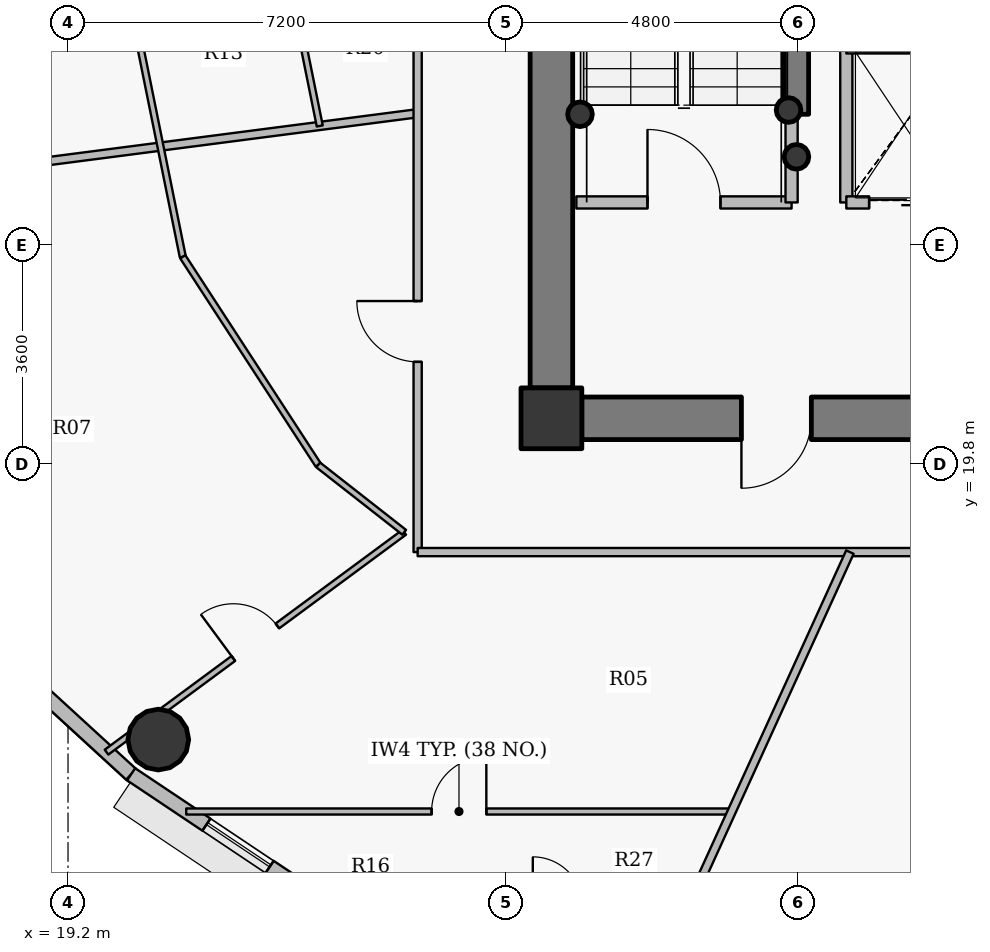
"""IFC4 building model, lengths in metres.
Left out: names, types, materials, properties, quantities, classifications, styles, units other than length and angle.
Written with IfcOpenShell. Run it as: python <this file> out.ifc"""

import sys

from ifc_helpers import new_model, si_unit, direction, frame, frame_2d, origin, origin_2d, place, context, subcontext, project, spatial, rectangle, hollow_circle, extrude, source, transform, mapped, element, fill, save


model = new_model("IFC4")
c1 = context("Model", 3, precision=1e-05, world=origin(), true_north=direction((0.0, 1.0)))
c2 = subcontext(c1, "Body", "Model", "MODEL_VIEW")
j1 = project(units=[si_unit("LENGTHUNIT", "METRE"), si_unit("PLANEANGLEUNIT", "RADIAN")], contexts=[c1])
p1 = place(None, origin())
s1 = spatial("IfcSite", under=j1, at=p1, CompositionType="ELEMENT")
p2 = place(p1, origin())
s2 = spatial("IfcBuilding", under=s1, at=p2, CompositionType="ELEMENT")
p3 = place(p2, frame((0.0, 0.0, 303.0)))
s3 = spatial("IfcBuildingStorey", under=s2, at=p3, CompositionType="ELEMENT", Elevation=303.0)
p4 = place(p3, frame((27.15, 20.55, 0.0), z_axis=(0.0, 0.0, 1.0), x_axis=(1.0, 0.0, 0.0)))
e1 = element("IfcColumn", 1, at=p4, inside=s3, PredefinedType="COLUMN", context=c2, shape_type="SweptSolid", body=[
    extrude(rectangle(XDim=1.0, YDim=1.0, at=origin_2d()), origin(), (0.0, 0.0, 1.0), 3.75),
])
for number, where, z_axis, x_axis in (
    (2, (31.05, 25.62, 0.0), (0.0, 0.0, 1.0), (1.0, 0.0, 0.0)),
    (3, (31.18, 24.85, 0.0), (0.0, 0.0, 1.0), (1.0, 0.0, 0.0)),
    (4, (27.62, 25.55, 0.0), (0.0, 0.0, 1.0), (1.0, 0.0, 0.0)),
):
    element("IfcColumn", number, at=place(p3, frame(where, z_axis=z_axis, x_axis=x_axis)), inside=s3, PredefinedType="COLUMN", context=c2, shape_type="SweptSolid", body=[
        extrude(hollow_circle(Radius=0.203, WallThickness=0.016, at=origin_2d()), origin(), (0.0, 0.0, 1.0), 3.75),
    ])
p5 = place(p3, frame((44.35, 20.55, 0.0), z_axis=(0.0, 0.0, 1.0), x_axis=(-1.0, 0.0, 0.0)))
e5 = element("IfcWall", 5, at=p5, inside=s3, PredefinedType="SHEAR", context=c2, shape_type="SweptSolid", body=[
    extrude(rectangle(XDim=16.7, YDim=0.7, at=frame_2d((8.35, 0.0))), origin(), (0.0, 0.0, 1.0), 3.05),
])
p6 = place(p5, frame((12.925, 0.0, 0.0)))
e6 = element("IfcOpeningElement", 6, at=p6, cuts=e5, PredefinedType="OPENING", context=c2, shape_type="SweptSolid", body=[
    extrude(rectangle(XDim=1.15, YDim=2.15, at=origin_2d()), frame((0.575, 0.36, 1.075), z_axis=(0.0, -1.0, 0.0), x_axis=(1.0, 0.0, 0.0)), (0.0, 0.0, 1.0), 0.72),
])
p7 = place(p5, frame((9.1, 0.0, 0.0)))
e7 = element("IfcOpeningElement", 7, at=p7, cuts=e5, PredefinedType="OPENING", context=c2, shape_type="SweptSolid", body=[
    extrude(rectangle(XDim=1.15, YDim=2.15, at=origin_2d()), frame((0.575, 0.36, 1.075), z_axis=(0.0, -1.0, 0.0), x_axis=(1.0, 0.0, 0.0)), (0.0, 0.0, 1.0), 0.72),
])
p8 = place(p3, frame((27.15, 21.05, 0.0), z_axis=(0.0, 0.0, 1.0), x_axis=(0.0, 1.0, 0.0)))
e8 = element("IfcWall", 8, at=p8, inside=s3, PredefinedType="SHEAR", context=c2, shape_type="SweptSolid", body=[
    extrude(rectangle(XDim=11.9, YDim=0.7, at=frame_2d((5.95, 0.0))), origin(), (0.0, 0.0, 1.0), 3.05),
])
p9 = place(p3, frame((31.18, 25.55, 0.0), z_axis=(0.0, 0.0, 1.0), x_axis=(0.0, 1.0, 0.0)))
e9 = element("IfcWall", 9, at=p9, inside=s3, PredefinedType="SHEAR", context=c2, shape_type="SweptSolid", body=[
    extrude(rectangle(XDim=2.25, YDim=0.4, at=frame_2d((1.125, 0.0))), origin(), (0.0, 0.0, 1.0), 3.1),
])
p10 = place(p3, frame((20.685, 15.267, 0.0), z_axis=(0.0, 0.0, 1.0), x_axis=(1.0, 0.0, 0.0)))
e10 = element("IfcColumn", 10, at=p10, inside=s3, PredefinedType="COLUMN", context=c2, shape_type="SweptSolid", body=[
    extrude(hollow_circle(Radius=0.5, WallThickness=0.032, at=origin_2d()), origin(), (0.0, 0.0, 1.0), 3.75),
])
p11 = place(p3, frame((20.238, 14.696, 0.0), z_axis=(0.0, 0.0, 1.0), x_axis=(-0.737068506972, 0.675818034703, 0.0)))
e11 = element("IfcWall", 11, at=p11, inside=s3, PredefinedType="SOLIDWALL", context=c2, shape_type="SweptSolid", body=[
    extrude(rectangle(XDim=3.077, YDim=0.24, at=frame_2d((1.539, 0.0))), origin(), (0.0, 0.0, 1.0), 3.5),
])
p12 = place(p3, frame((22.896, 12.918, 0.0), z_axis=(0.0, 0.0, 1.0), x_axis=(-0.831250592635, 0.55589787933, 0.0)))
e12 = element("IfcWall", 12, at=p12, inside=s3, PredefinedType="SOLIDWALL", context=c2, shape_type="SweptSolid", body=[
    extrude(rectangle(XDim=3.197, YDim=0.24, at=frame_2d((1.599, 0.0))), origin(), (0.0, 0.0, 1.0), 3.5),
])
p13 = place(p12, frame((0.458, 0.0, 0.9)))
e13 = element("IfcOpeningElement", 13, at=p13, cuts=e12, PredefinedType="OPENING", context=c2, shape_type="SweptSolid", body=[
    extrude(rectangle(XDim=1.25, YDim=1.65, at=origin_2d()), frame((0.625, 0.13, 0.825), z_axis=(0.0, -1.0, 0.0), x_axis=(1.0, 0.0, 0.0)), (0.0, 0.0, 1.0), 0.26),
])
p14 = place(p3, frame((14.033, 24.151, 0.0), z_axis=(0.0, 0.0, 1.0), x_axis=(0.99169266035, 0.128629963101, 0.0)))
e14 = element("IfcWall", 14, at=p14, inside=s3, PredefinedType="PARTITIONING", context=c2, shape_type="SweptSolid", body=[
    extrude(rectangle(XDim=11.009, YDim=0.135, at=frame_2d((5.504, 0.0))), origin(), (0.0, 0.0, 1.0), 2.985),
])
p15 = place(p3, frame((19.833, 15.06, 0.0), z_axis=(0.0, 0.0, 1.0), x_axis=(0.804387847123, 0.594104529019, 0.0)))
e15 = element("IfcWall", 15, at=p15, inside=s3, PredefinedType="PARTITIONING", context=c2, shape_type="SweptSolid", body=[
    extrude(rectangle(XDim=6.086, YDim=0.1, at=frame_2d((3.043, 0.0))), origin(), (0.0, 0.0, 1.0), 3.5),
])
p16 = place(p15, frame((2.593, 0.0, 0.0)))
e16 = element("IfcOpeningElement", 16, at=p16, cuts=e15, PredefinedType="OPENING", context=c2, shape_type="SweptSolid", body=[
    extrude(rectangle(XDim=0.9, YDim=2.1, at=origin_2d()), frame((0.45, 0.06, 1.05), z_axis=(0.0, -1.0, 0.0), x_axis=(1.0, 0.0, 0.0)), (0.0, 0.0, 1.0), 0.12),
])
p17 = place(p3, frame((20.32, 27.0, 0.0), z_axis=(0.0, 0.0, 1.0), x_axis=(0.198226068862, -0.980156327135, 0.0)))
e17 = element("IfcWall", 17, at=p17, inside=s3, PredefinedType="PARTITIONING", context=c2, shape_type="SweptSolid", body=[
    extrude(rectangle(XDim=3.871, YDim=0.1, at=frame_2d((1.936, 0.0))), origin(), (0.0, 0.0, 1.0), 3.035),
])
p18 = place(p3, frame((21.087, 23.206, 0.0), z_axis=(0.0, 0.0, 1.0), x_axis=(0.545435886628, -0.838152547916, 0.0)))
e18 = element("IfcWall", 18, at=p18, inside=s3, PredefinedType="PARTITIONING", context=c2, shape_type="SweptSolid", body=[
    extrude(rectangle(XDim=4.083, YDim=0.1, at=frame_2d((2.042, 0.0))), origin(), (0.0, 0.0, 1.0), 3.035),
])
p19 = place(p3, frame((21.144, 14.084, 0.0), z_axis=(0.0, 0.0, 1.0), x_axis=(1.0, 0.0, 0.0)))
e19 = element("IfcWall", 19, at=p19, inside=s3, PredefinedType="PARTITIONING", context=c2, shape_type="SweptSolid", body=[
    extrude(rectangle(XDim=8.971, YDim=0.1, at=frame_2d((4.486, 0.0))), origin(), (0.0, 0.0, 1.0), 2.985),
])
p20 = place(p19, frame((4.036, 0.0, 0.0)))
e20 = element("IfcOpeningElement", 20, at=p20, cuts=e19, PredefinedType="OPENING", context=c2, shape_type="SweptSolid", body=[
    extrude(rectangle(XDim=0.9, YDim=2.1, at=origin_2d()), frame((0.45, 0.06, 1.05), z_axis=(0.0, -1.0, 0.0), x_axis=(1.0, 0.0, 0.0)), (0.0, 0.0, 1.0), 0.12),
])
p21 = place(p3, frame((23.008, 27.0, 0.0), z_axis=(0.0, 0.0, 1.0), x_axis=(0.198189512146, -0.980163719628, 0.0)))
e21 = element("IfcWall", 21, at=p21, inside=s3, PredefinedType="PARTITIONING", context=c2, shape_type="SweptSolid", body=[
    extrude(rectangle(XDim=1.675, YDim=0.1, at=frame_2d((0.838, 0.0))), origin(), (0.0, 0.0, 1.0), 3.035),
])
p22 = place(p3, frame((23.315, 19.783, 0.0), z_axis=(0.0, 0.0, 1.0), x_axis=(0.787284128546, -0.616590383431, 0.0)))
e22 = element("IfcWall", 22, at=p22, inside=s3, PredefinedType="PARTITIONING", context=c2, shape_type="SweptSolid", body=[
    extrude(rectangle(XDim=1.796, YDim=0.1, at=frame_2d((0.898, 0.0))), origin(), (0.0, 0.0, 1.0), 3.5),
])
p23 = place(p3, frame((24.95, 18.35, 0.0), z_axis=(0.0, 0.0, 1.0), x_axis=(0.0, 1.0, 0.0)))
e23 = element("IfcWall", 23, at=p23, inside=s3, PredefinedType="PARTITIONING", context=c2, shape_type="SweptSolid", body=[
    extrude(rectangle(XDim=11.45, YDim=0.135, at=frame_2d((5.725, 0.0))), origin(), (0.0, 0.0, 1.0), 3.035),
])
p24 = place(p23, frame((3.128, 0.0, 0.0)))
e24 = element("IfcOpeningElement", 24, at=p24, cuts=e23, PredefinedType="OPENING", context=c2, shape_type="SweptSolid", body=[
    extrude(rectangle(XDim=1.0, YDim=2.15, at=origin_2d()), frame((0.5, 0.078, 1.075), z_axis=(0.0, -1.0, 0.0), x_axis=(1.0, 0.0, 0.0)), (0.0, 0.0, 1.0), 0.155),
])
p25 = place(p3, frame((24.95, 18.35, 0.0), z_axis=(0.0, 0.0, 1.0), x_axis=(1.0, 0.0, 0.0)))
e25 = element("IfcWall", 25, at=p25, inside=s3, PredefinedType="PARTITIONING", context=c2, shape_type="SweptSolid", body=[
    extrude(rectangle(XDim=22.1, YDim=0.135, at=frame_2d((11.05, 0.0))), origin(), (0.0, 0.0, 1.0), 3.035),
])
p26 = place(p25, frame((8.131, 0.0, 0.0)))
e26 = element("IfcOpeningElement", 26, at=p26, cuts=e25, PredefinedType="OPENING", context=c2, shape_type="SweptSolid", body=[
    extrude(rectangle(XDim=1.0, YDim=2.15, at=origin_2d()), frame((0.5, 0.078, 1.075), z_axis=(0.0, -1.0, 0.0), x_axis=(1.0, 0.0, 0.0)), (0.0, 0.0, 1.0), 0.155),
])
p27 = place(p25, frame((19.081, 0.0, 0.0)))
e27 = element("IfcOpeningElement", 27, at=p27, cuts=e25, PredefinedType="OPENING", context=c2, shape_type="SweptSolid", body=[
    extrude(rectangle(XDim=1.0, YDim=2.15, at=origin_2d()), frame((0.5, 0.078, 1.075), z_axis=(0.0, -1.0, 0.0), x_axis=(1.0, 0.0, 0.0)), (0.0, 0.0, 1.0), 0.155),
])
p28 = place(p3, frame((27.56, 24.1, 0.0), z_axis=(0.0, 0.0, 1.0), x_axis=(1.0, 0.0, 0.0)))
e28 = element("IfcWall", 28, at=p28, inside=s3, PredefinedType="PARTITIONING", context=c2, shape_type="SweptSolid", body=[
    extrude(rectangle(XDim=3.54, YDim=0.2, at=frame_2d((1.77, 0.0))), origin(), (0.0, 0.0, 1.0), 3.5),
])
p29 = place(p28, frame((1.17, 0.0, 0.0)))
e29 = element("IfcOpeningElement", 29, at=p29, cuts=e28, PredefinedType="OPENING", context=c2, shape_type="SweptSolid", body=[
    extrude(rectangle(XDim=1.2, YDim=2.15, at=origin_2d()), frame((0.6, 0.11, 1.075), z_axis=(0.0, -1.0, 0.0), x_axis=(1.0, 0.0, 0.0)), (0.0, 0.0, 1.0), 0.22),
])
p30 = place(p3, frame((28.537, 10.62, 0.0), z_axis=(0.0, 0.0, 1.0), x_axis=(0.414582330606, 0.910011808247, 0.0)))
e30 = element("IfcWall", 30, at=p30, inside=s3, PredefinedType="PARTITIONING", context=c2, shape_type="SweptSolid", body=[
    extrude(rectangle(XDim=8.495, YDim=0.135, at=frame_2d((4.247, 0.0))), origin(), (0.0, 0.0, 1.0), 2.985),
])
p31 = place(p3, frame((31.1, 24.1, 0.0), z_axis=(0.0, 0.0, 1.0), x_axis=(0.0, 1.0, 0.0)))
e31 = element("IfcWall", 31, at=p31, inside=s3, PredefinedType="PARTITIONING", context=c2, shape_type="SweptSolid", body=[
    extrude(rectangle(XDim=1.44, YDim=0.2, at=frame_2d((0.72, 0.0))), origin(), (0.0, 0.0, 1.0), 3.5),
])
p32 = place(p3, frame((32.0, 24.1, 0.0), z_axis=(0.0, 0.0, 1.0), x_axis=(0.0, 1.0, 0.0)))
e32 = element("IfcWall", 32, at=p32, inside=s3, PredefinedType="PARTITIONING", context=c2, shape_type="SweptSolid", body=[
    extrude(rectangle(XDim=3.45, YDim=0.2, at=frame_2d((1.725, 0.0))), origin(), (0.0, 0.0, 1.0), 3.5),
])
p33 = place(p3, frame((32.0, 24.1, 0.0), z_axis=(0.0, 0.0, 1.0), x_axis=(1.0, 0.0, 0.0)))
e33 = element("IfcWall", 33, at=p33, inside=s3, PredefinedType="PARTITIONING", context=c2, shape_type="SweptSolid", body=[
    extrude(rectangle(XDim=1.9, YDim=0.2, at=frame_2d((0.95, 0.0))), origin(), (0.0, 0.0, 1.0), 3.085),
])
p34 = place(p33, frame((0.375, 0.0, 0.0)))
e34 = element("IfcOpeningElement", 34, at=p34, cuts=e33, PredefinedType="OPENING", context=c2, shape_type="SweptSolid", body=[
    extrude(rectangle(XDim=1.15, YDim=2.15, at=origin_2d()), frame((0.575, 0.11, 1.075), z_axis=(0.0, -1.0, 0.0), x_axis=(1.0, 0.0, 0.0)), (0.0, 0.0, 1.0), 0.22),
])
p35 = place(p3, frame((32.0, 26.65, 0.0), z_axis=(0.0, 0.0, 1.0), x_axis=(1.0, 0.0, 0.0)))
e35 = element("IfcWall", 35, at=p35, inside=s3, PredefinedType="PARTITIONING", context=c2, shape_type="SweptSolid", body=[
    extrude(rectangle(XDim=1.9, YDim=0.2, at=frame_2d((0.95, 0.0))), origin(), (0.0, 0.0, 1.0), 3.085),
])
p36 = place(p3, frame((26.8, 21.04, 0.0), z_axis=(0.0, 0.0, 1.0), x_axis=(0.0, -1.0, 0.0)))
e36 = element("IfcWall", 36, at=p36, inside=s3, PredefinedType="PARTITIONING", context=c2, shape_type="SweptSolid", body=[
    extrude(rectangle(XDim=0.84, YDim=0.135, at=frame_2d((0.42, 0.0))), origin(), (0.0, 0.0, 1.0), 3.035),
])
p37 = place(p3, frame((27.107, 20.2, 0.0), z_axis=(0.0, 0.0, 1.0), x_axis=(1.0, 0.0, 0.0)))
e37 = element("IfcWall", 37, at=p37, inside=s3, PredefinedType="PARTITIONING", context=c2, shape_type="SweptSolid", body=[
    extrude(rectangle(XDim=0.532, YDim=0.135, at=frame_2d((0.266, 0.0))), origin(), (0.0, 0.0, 1.0), 3.035),
])
m1 = source(origin(), c2, "Body", "SweptSolid", [
    extrude(rectangle(XDim=1.25, YDim=1.65, at=origin_2d()), frame((0.625, 0.03, 0.825), z_axis=(0.0, -1.0, 0.0), x_axis=(1.0, 0.0, 0.0)), (0.0, 0.0, 1.0), 0.06),
])
p38 = place(p13, origin())
e38 = element("IfcWindow", 38, at=p38, inside=s3, PartitioningType="SINGLE_PANEL", PredefinedType="WINDOW", context=c2, shape_type="MappedRepresentation", body=[
    mapped(m1, transform((0.0, 0.0, 0.0), x_axis=(1.0, 0.0, 0.0), y_axis=(0.0, 1.0, 0.0), z_axis=(0.0, 0.0, 1.0), scale=1.0)),
])
fill(e13, e38)
m2 = source(origin(), c2, "Body", "SweptSolid", [
    extrude(rectangle(XDim=1.15, YDim=2.15, at=origin_2d()), frame((0.575, 0.025, 1.075), z_axis=(0.0, -1.0, 0.0), x_axis=(1.0, 0.0, 0.0)), (0.0, 0.0, 1.0), 0.05),
])
p39 = place(p6, origin())
e39 = element("IfcDoor", 39, at=p39, inside=s3, OperationType="SINGLE_SWING_RIGHT", PredefinedType="DOOR", context=c2, shape_type="MappedRepresentation", body=[
    mapped(m2, transform((0.0, 0.0, 0.0), x_axis=(1.0, 0.0, 0.0), y_axis=(0.0, 1.0, 0.0), z_axis=(0.0, 0.0, 1.0), scale=1.0)),
])
fill(e6, e39)
m3 = source(origin(), c2, "Body", "SweptSolid", [
    extrude(rectangle(XDim=1.2, YDim=2.15, at=origin_2d()), frame((0.6, 0.025, 1.075), z_axis=(0.0, -1.0, 0.0), x_axis=(1.0, 0.0, 0.0)), (0.0, 0.0, 1.0), 0.05),
])
p40 = place(p29, origin())
e40 = element("IfcDoor", 40, at=p40, inside=s3, OperationType="SINGLE_SWING_LEFT", PredefinedType="DOOR", context=c2, shape_type="MappedRepresentation", body=[
    mapped(m3, transform((0.0, 0.0, 0.0), x_axis=(1.0, 0.0, 0.0), y_axis=(0.0, 1.0, 0.0), z_axis=(0.0, 0.0, 1.0), scale=1.0)),
])
fill(e29, e40)
m4 = source(origin(), c2, "Body", "SweptSolid", [
    extrude(rectangle(XDim=1.15, YDim=2.15, at=origin_2d()), frame((0.575, 0.025, 1.075), z_axis=(0.0, -1.0, 0.0), x_axis=(1.0, 0.0, 0.0)), (0.0, 0.0, 1.0), 0.05),
])
p41 = place(p34, origin())
e41 = element("IfcDoor", 41, at=p41, inside=s3, OperationType="DOUBLE_DOOR_SLIDING", PredefinedType="USERDEFINED", context=c2, shape_type="MappedRepresentation", body=[
    mapped(m4, transform((0.0, 0.0, 0.0), x_axis=(1.0, 0.0, 0.0), y_axis=(0.0, 1.0, 0.0), z_axis=(0.0, 0.0, 1.0), scale=1.0)),
])
fill(e34, e41)
m5 = source(origin(), c2, "Body", "SweptSolid", [
    extrude(rectangle(XDim=1.0, YDim=2.15, at=origin_2d()), frame((0.5, 0.025, 1.075), z_axis=(0.0, -1.0, 0.0), x_axis=(1.0, 0.0, 0.0)), (0.0, 0.0, 1.0), 0.05),
])
p42 = place(p24, origin())
e42 = element("IfcDoor", 42, at=p42, inside=s3, OperationType="SINGLE_SWING_RIGHT", PredefinedType="DOOR", context=c2, shape_type="MappedRepresentation", body=[
    mapped(m5, transform((0.0, 0.0, 0.0), x_axis=(1.0, 0.0, 0.0), y_axis=(0.0, 1.0, 0.0), z_axis=(0.0, 0.0, 1.0), scale=1.0)),
])
fill(e24, e42)
m6 = source(origin(), c2, "Body", "SweptSolid", [
    extrude(rectangle(XDim=0.9, YDim=2.1, at=origin_2d()), frame((0.45, 0.025, 1.05), z_axis=(0.0, -1.0, 0.0), x_axis=(1.0, 0.0, 0.0)), (0.0, 0.0, 1.0), 0.05),
])
p43 = place(p16, origin())
e43 = element("IfcDoor", 43, at=p43, inside=s3, OperationType="SINGLE_SWING_LEFT", PredefinedType="DOOR", context=c2, shape_type="MappedRepresentation", body=[
    mapped(m6, transform((0.0, 0.0, 0.0), x_axis=(1.0, 0.0, 0.0), y_axis=(0.0, 1.0, 0.0), z_axis=(0.0, 0.0, 1.0), scale=1.0)),
])
fill(e16, e43)
p44 = place(p20, origin())
e44 = element("IfcDoor", 44, at=p44, inside=s3, OperationType="SINGLE_SWING_RIGHT", PredefinedType="DOOR", context=c2, shape_type="MappedRepresentation", body=[
    mapped(m6, transform((0.0, 0.0, 0.0), x_axis=(1.0, 0.0, 0.0), y_axis=(0.0, 1.0, 0.0), z_axis=(0.0, 0.0, 1.0), scale=1.0)),
])
fill(e20, e44)
save(model, sys.argv[1])
